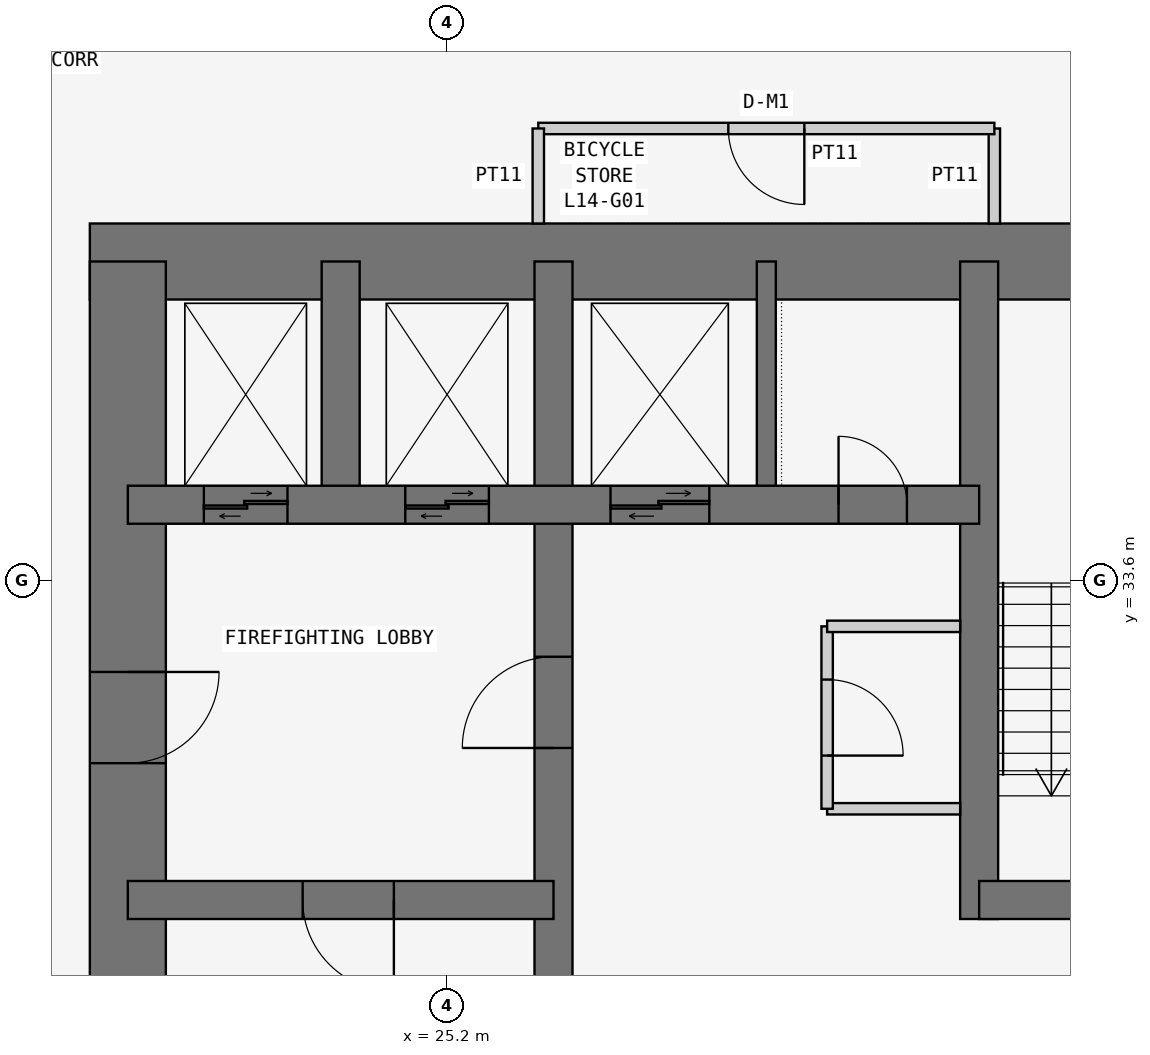
"""IFC4 building model, lengths in metres.
Left out: names, types, materials, properties, quantities, classifications, styles, units other than length and angle.
Written with IfcOpenShell. Run it as: python <this file> out.ifc"""

import sys

from ifc_helpers import new_model, si_unit, direction, frame, frame_2d, origin, place, context, subcontext, project, spatial, rectangle, extrude, element, fill, save


model = new_model("IFC4")
c1 = context("Model", 3, precision=1e-05, world=origin(), true_north=direction((0.0, 1.0)))
c2 = subcontext(c1, "Body", "Model", "MODEL_VIEW")
j1 = project(units=[si_unit("LENGTHUNIT", "METRE"), si_unit("PLANEANGLEUNIT", "RADIAN")], contexts=[c1])
p1 = place(None, origin())
s1 = spatial("IfcSite", under=j1, at=p1, CompositionType="ELEMENT")
p2 = place(p1, origin())
s2 = spatial("IfcBuilding", under=s1, at=p2, CompositionType="ELEMENT")
p3 = place(p2, frame((0.0, 0.0, 59.7)))
s3 = spatial("IfcBuildingStorey", under=s2, at=p3, CompositionType="ELEMENT", Elevation=59.7)
p4 = place(p3, frame((37.8, 37.8, 0.0), z_axis=(0.0, 0.0, 1.0), x_axis=(-1.0, 0.0, 0.0)))
e1 = element("IfcWall", 1, at=p4, inside=s3, PredefinedType="SHEAR", context=c2, shape_type="SweptSolid", body=[
    extrude(rectangle(XDim=17.3, YDim=1.0, at=frame_2d((8.65, 0.0))), origin(), (0.0, 0.0, 1.0), 3.6),
])
p5 = place(p3, frame((21.0, 37.8, 0.0), z_axis=(0.0, 0.0, 1.0), x_axis=(0.0, -1.0, 0.0)))
e2 = element("IfcWall", 2, at=p5, inside=s3, PredefinedType="SHEAR", context=c2, shape_type="SweptSolid", body=[
    extrude(rectangle(XDim=17.3, YDim=1.0, at=frame_2d((8.65, 0.0))), origin(), (0.0, 0.0, 1.0), 3.6),
])
p6 = place(p5, frame((5.4, 0.0, 0.0)))
e3 = element("IfcOpeningElement", 3, at=p6, cuts=e2, PredefinedType="OPENING", context=c2, shape_type="SweptSolid", body=[
    extrude(rectangle(XDim=1.2, YDim=2.1, at=frame_2d((0.6, 1.05))), frame((0.0, 0.51, 0.0), z_axis=(0.0, -1.0, 0.0), x_axis=(1.0, 0.0, 0.0)), (0.0, 0.0, 1.0), 1.02),
])
p7 = place(p3, frame((26.6, 21.0, 0.0), z_axis=(0.0, 0.0, 1.0), x_axis=(0.0, 1.0, 0.0)))
e4 = element("IfcWall", 4, at=p7, inside=s3, PredefinedType="SHEAR", context=c2, shape_type="SweptSolid", body=[
    extrude(rectangle(XDim=16.8, YDim=0.5, at=frame_2d((8.4, 0.0))), origin(), (0.0, 0.0, 1.0), 3.6),
])
p8 = place(p7, frame((10.4, 0.0, 0.0)))
e5 = element("IfcOpeningElement", 5, at=p8, cuts=e4, PredefinedType="OPENING", context=c2, shape_type="SweptSolid", body=[
    extrude(rectangle(XDim=1.2, YDim=2.1, at=frame_2d((0.6, 1.05))), frame((0.0, 0.26, 0.0), z_axis=(0.0, -1.0, 0.0), x_axis=(1.0, 0.0, 0.0)), (0.0, 0.0, 1.0), 0.52),
])
p9 = place(p3, frame((21.0, 29.4, 0.0), z_axis=(0.0, 0.0, 1.0), x_axis=(1.0, 0.0, 0.0)))
e6 = element("IfcWall", 6, at=p9, inside=s3, PredefinedType="SHEAR", context=c2, shape_type="SweptSolid", body=[
    extrude(rectangle(XDim=5.6, YDim=0.5, at=frame_2d((2.8, 0.0))), origin(), (0.0, 0.0, 1.0), 3.6),
])
p10 = place(p9, frame((2.3, 0.0, 0.0)))
e7 = element("IfcOpeningElement", 7, at=p10, cuts=e6, PredefinedType="OPENING", context=c2, shape_type="SweptSolid", body=[
    extrude(rectangle(XDim=1.2, YDim=2.1, at=frame_2d((0.6, 1.05))), frame((0.0, 0.26, 0.0), z_axis=(0.0, -1.0, 0.0), x_axis=(1.0, 0.0, 0.0)), (0.0, 0.0, 1.0), 0.52),
])
p11 = place(p3, frame((21.0, 34.6, 0.0), z_axis=(0.0, 0.0, 1.0), x_axis=(1.0, 0.0, 0.0)))
e8 = element("IfcWall", 8, at=p11, inside=s3, PredefinedType="SHEAR", context=c2, shape_type="SweptSolid", body=[
    extrude(rectangle(XDim=11.2, YDim=0.5, at=frame_2d((5.6, 0.0))), origin(), (0.0, 0.0, 1.0), 3.6),
])
p12 = place(p11, frame((9.35, 0.0, 0.0)))
e9 = element("IfcOpeningElement", 9, at=p12, cuts=e8, PredefinedType="OPENING", context=c2, shape_type="SweptSolid", body=[
    extrude(rectangle(XDim=0.9, YDim=2.1, at=frame_2d((0.45, 1.05))), frame((0.0, 0.26, 0.0), z_axis=(0.0, -1.0, 0.0), x_axis=(1.0, 0.0, 0.0)), (0.0, 0.0, 1.0), 0.52),
])
p13 = place(p11, frame((1.0, 0.0, 0.0)))
e10 = element("IfcOpeningElement", 10, at=p13, cuts=e8, PredefinedType="OPENING", context=c2, shape_type="SweptSolid", body=[
    extrude(rectangle(XDim=1.1, YDim=2.1, at=frame_2d((0.55, 1.05))), frame((0.0, 0.26, 0.0), z_axis=(0.0, -1.0, 0.0), x_axis=(1.0, 0.0, 0.0)), (0.0, 0.0, 1.0), 0.52),
])
p14 = place(p11, frame((3.65, 0.0, 0.0)))
e11 = element("IfcOpeningElement", 11, at=p14, cuts=e8, PredefinedType="OPENING", context=c2, shape_type="SweptSolid", body=[
    extrude(rectangle(XDim=1.1, YDim=2.1, at=frame_2d((0.55, 1.05))), frame((0.0, 0.26, 0.0), z_axis=(0.0, -1.0, 0.0), x_axis=(1.0, 0.0, 0.0)), (0.0, 0.0, 1.0), 0.52),
])
p15 = place(p11, frame((6.35, 0.0, 0.0)))
e12 = element("IfcOpeningElement", 12, at=p15, cuts=e8, PredefinedType="OPENING", context=c2, shape_type="SweptSolid", body=[
    extrude(rectangle(XDim=1.3, YDim=2.1, at=frame_2d((0.65, 1.05))), frame((0.0, 0.26, 0.0), z_axis=(0.0, -1.0, 0.0), x_axis=(1.0, 0.0, 0.0)), (0.0, 0.0, 1.0), 0.52),
])
p16 = place(p3, frame((23.8, 34.6, 0.0), z_axis=(0.0, 0.0, 1.0), x_axis=(0.0, 1.0, 0.0)))
e13 = element("IfcWall", 13, at=p16, inside=s3, PredefinedType="SHEAR", context=c2, shape_type="SweptSolid", body=[
    extrude(rectangle(XDim=3.2, YDim=0.5, at=frame_2d((1.6, 0.0))), origin(), (0.0, 0.0, 1.0), 3.6),
])
p17 = place(p3, frame((32.2, 29.15, 0.0), z_axis=(0.0, 0.0, 1.0), x_axis=(0.0, 1.0, 0.0)))
e14 = element("IfcWall", 14, at=p17, inside=s3, PredefinedType="SHEAR", context=c2, shape_type="SweptSolid", body=[
    extrude(rectangle(XDim=8.65, YDim=0.5, at=frame_2d((4.325, 0.0))), origin(), (0.0, 0.0, 1.0), 3.6),
])
p18 = place(p3, frame((32.2, 29.4, 0.0), z_axis=(0.0, 0.0, 1.0), x_axis=(1.0, 0.0, 0.0)))
e15 = element("IfcWall", 15, at=p18, inside=s3, PredefinedType="SHEAR", context=c2, shape_type="SweptSolid", body=[
    extrude(rectangle(XDim=5.6, YDim=0.5, at=frame_2d((2.8, 0.0))), origin(), (0.0, 0.0, 1.0), 3.6),
])
p19 = place(p18, frame((2.0, 0.0, 0.0)))
e16 = element("IfcOpeningElement", 16, at=p19, cuts=e15, PredefinedType="OPENING", context=c2, shape_type="SweptSolid", body=[
    extrude(rectangle(XDim=1.2, YDim=2.1, at=frame_2d((0.6, 1.05))), frame((0.0, 0.26, 0.0), z_axis=(0.0, -1.0, 0.0), x_axis=(1.0, 0.0, 0.0)), (0.0, 0.0, 1.0), 0.52),
])
p20 = place(p3, frame((29.4, 34.6, 0.0), z_axis=(0.0, 0.0, 1.0), x_axis=(0.0, 1.0, 0.0)))
e17 = element("IfcWall", 17, at=p20, inside=s3, PredefinedType="SHEAR", context=c2, shape_type="SweptSolid", body=[
    extrude(rectangle(XDim=3.2, YDim=0.25, at=frame_2d((1.6, 0.0))), origin(), (0.0, 0.0, 1.0), 3.6),
])
p21 = place(p3, frame((32.4, 38.3, 0.0), z_axis=(0.0, 0.0, 1.0), x_axis=(0.0, 1.0, 0.0)))
e18 = element("IfcWall", 18, at=p21, inside=s3, PredefinedType="PARTITIONING", context=c2, shape_type="SweptSolid", body=[
    extrude(rectangle(XDim=1.25, YDim=0.15, at=frame_2d((0.625, 0.0))), origin(), (0.0, 0.0, 1.0), 3.45),
])
p22 = place(p3, frame((32.4, 39.55, 0.0), z_axis=(0.0, 0.0, 1.0), x_axis=(-1.0, 0.0, 0.0)))
e19 = element("IfcWall", 19, at=p22, inside=s3, PredefinedType="PARTITIONING", context=c2, shape_type="SweptSolid", body=[
    extrude(rectangle(XDim=6.0, YDim=0.15, at=frame_2d((3.0, 0.0))), origin(), (0.0, 0.0, 1.0), 3.45),
])
p23 = place(p22, frame((2.5, 0.0, 0.0)))
e20 = element("IfcOpeningElement", 20, at=p23, cuts=e19, PredefinedType="OPENING", context=c2, shape_type="SweptSolid", body=[
    extrude(rectangle(XDim=1.0, YDim=2.1, at=frame_2d((0.5, 1.05))), frame((0.0, 0.085, 0.0), z_axis=(0.0, -1.0, 0.0), x_axis=(1.0, 0.0, 0.0)), (0.0, 0.0, 1.0), 0.17),
])
p24 = place(p3, frame((26.4, 39.55, 0.0), z_axis=(0.0, 0.0, 1.0), x_axis=(0.0, -1.0, 0.0)))
e21 = element("IfcWall", 21, at=p24, inside=s3, PredefinedType="PARTITIONING", context=c2, shape_type="SweptSolid", body=[
    extrude(rectangle(XDim=1.25, YDim=0.15, at=frame_2d((0.625, 0.0))), origin(), (0.0, 0.0, 1.0), 3.45),
])
p25 = place(p3, frame((31.95, 30.6, 0.0), z_axis=(0.0, 0.0, 1.0), x_axis=(-1.0, 0.0, 0.0)))
e22 = element("IfcWall", 22, at=p25, inside=s3, PredefinedType="PARTITIONING", context=c2, shape_type="SweptSolid", body=[
    extrude(rectangle(XDim=1.75, YDim=0.15, at=frame_2d((0.875, 0.0))), origin(), (0.0, 0.0, 1.0), 3.45),
])
p26 = place(p3, frame((30.2, 30.6, 0.0), z_axis=(0.0, 0.0, 1.0), x_axis=(0.0, 1.0, 0.0)))
e23 = element("IfcWall", 23, at=p26, inside=s3, PredefinedType="PARTITIONING", context=c2, shape_type="SweptSolid", body=[
    extrude(rectangle(XDim=2.4, YDim=0.15, at=frame_2d((1.2, 0.0))), origin(), (0.0, 0.0, 1.0), 3.45),
])
p27 = place(p26, frame((0.7, 0.0, 0.0)))
e24 = element("IfcOpeningElement", 24, at=p27, cuts=e23, PredefinedType="OPENING", context=c2, shape_type="SweptSolid", body=[
    extrude(rectangle(XDim=1.0, YDim=2.1, at=frame_2d((0.5, 1.05))), frame((0.0, 0.085, 0.0), z_axis=(0.0, -1.0, 0.0), x_axis=(1.0, 0.0, 0.0)), (0.0, 0.0, 1.0), 0.17),
])
p28 = place(p3, frame((30.2, 33.0, 0.0), z_axis=(0.0, 0.0, 1.0), x_axis=(1.0, 0.0, 0.0)))
e25 = element("IfcWall", 25, at=p28, inside=s3, PredefinedType="PARTITIONING", context=c2, shape_type="SweptSolid", body=[
    extrude(rectangle(XDim=1.75, YDim=0.15, at=frame_2d((0.875, 0.0))), origin(), (0.0, 0.0, 1.0), 3.45),
])
p29 = place(p23, origin())
e26 = element("IfcDoor", 26, at=p29, inside=s3, OperationType="SINGLE_SWING_LEFT", PredefinedType="DOOR", context=c2, shape_type="SweptSolid", body=[
    extrude(rectangle(XDim=1.0, YDim=2.1, at=frame_2d((0.5, 1.05))), frame((0.0, 0.025, 0.0), z_axis=(0.0, -1.0, 0.0), x_axis=(1.0, 0.0, 0.0)), (0.0, 0.0, 1.0), 0.05),
])
fill(e20, e26)
p30 = place(p6, origin())
e27 = element("IfcDoor", 27, at=p30, inside=s3, OperationType="SINGLE_SWING_LEFT", PredefinedType="DOOR", context=c2, shape_type="SweptSolid", body=[
    extrude(rectangle(XDim=1.2, YDim=2.1, at=frame_2d((0.6, 1.05))), frame((0.0, 0.025, 0.0), z_axis=(0.0, -1.0, 0.0), x_axis=(1.0, 0.0, 0.0)), (0.0, 0.0, 1.0), 0.05),
])
fill(e3, e27)
p31 = place(p10, frame((1.2, 0.0, 0.0), z_axis=(0.0, 0.0, 1.0), x_axis=(-1.0, 0.0, 0.0)))
e28 = element("IfcDoor", 28, at=p31, inside=s3, OperationType="SINGLE_SWING_LEFT", PredefinedType="DOOR", context=c2, shape_type="SweptSolid", body=[
    extrude(rectangle(XDim=1.2, YDim=2.1, at=frame_2d((0.6, 1.05))), frame((0.0, 0.025, 0.0), z_axis=(0.0, -1.0, 0.0), x_axis=(1.0, 0.0, 0.0)), (0.0, 0.0, 1.0), 0.05),
])
fill(e7, e28)
p32 = place(p8, origin())
e29 = element("IfcDoor", 29, at=p32, inside=s3, OperationType="SINGLE_SWING_LEFT", PredefinedType="DOOR", context=c2, shape_type="SweptSolid", body=[
    extrude(rectangle(XDim=1.2, YDim=2.1, at=frame_2d((0.6, 1.05))), frame((0.0, 0.025, 0.0), z_axis=(0.0, -1.0, 0.0), x_axis=(1.0, 0.0, 0.0)), (0.0, 0.0, 1.0), 0.05),
])
fill(e5, e29)
p33 = place(p12, origin())
e30 = element("IfcDoor", 30, at=p33, inside=s3, OperationType="SINGLE_SWING_LEFT", PredefinedType="DOOR", context=c2, shape_type="SweptSolid", body=[
    extrude(rectangle(XDim=0.9, YDim=2.1, at=frame_2d((0.45, 1.05))), frame((0.0, 0.025, 0.0), z_axis=(0.0, -1.0, 0.0), x_axis=(1.0, 0.0, 0.0)), (0.0, 0.0, 1.0), 0.05),
])
fill(e9, e30)
p34 = place(p27, frame((1.0, 0.0, 0.0), z_axis=(0.0, 0.0, 1.0), x_axis=(-1.0, 0.0, 0.0)))
e31 = element("IfcDoor", 31, at=p34, inside=s3, OperationType="SINGLE_SWING_RIGHT", PredefinedType="DOOR", context=c2, shape_type="SweptSolid", body=[
    extrude(rectangle(XDim=1.0, YDim=2.1, at=frame_2d((0.5, 1.05))), frame((0.0, 0.025, 0.0), z_axis=(0.0, -1.0, 0.0), x_axis=(1.0, 0.0, 0.0)), (0.0, 0.0, 1.0), 0.05),
])
fill(e24, e31)
p35 = place(p13, origin())
e32 = element("IfcDoor", 32, at=p35, inside=s3, OperationType="DOUBLE_DOOR_SLIDING", PredefinedType="DOOR", context=c2, shape_type="SweptSolid", body=[
    extrude(rectangle(XDim=1.1, YDim=2.1, at=frame_2d((0.55, 1.05))), frame((0.0, 0.025, 0.0), z_axis=(0.0, -1.0, 0.0), x_axis=(1.0, 0.0, 0.0)), (0.0, 0.0, 1.0), 0.05),
])
fill(e10, e32)
p36 = place(p14, origin())
e33 = element("IfcDoor", 33, at=p36, inside=s3, OperationType="DOUBLE_DOOR_SLIDING", PredefinedType="DOOR", context=c2, shape_type="SweptSolid", body=[
    extrude(rectangle(XDim=1.1, YDim=2.1, at=frame_2d((0.55, 1.05))), frame((0.0, 0.025, 0.0), z_axis=(0.0, -1.0, 0.0), x_axis=(1.0, 0.0, 0.0)), (0.0, 0.0, 1.0), 0.05),
])
fill(e11, e33)
p37 = place(p15, origin())
e34 = element("IfcDoor", 34, at=p37, inside=s3, OperationType="DOUBLE_DOOR_SLIDING", PredefinedType="DOOR", context=c2, shape_type="SweptSolid", body=[
    extrude(rectangle(XDim=1.3, YDim=2.1, at=frame_2d((0.65, 1.05))), frame((0.0, 0.025, 0.0), z_axis=(0.0, -1.0, 0.0), x_axis=(1.0, 0.0, 0.0)), (0.0, 0.0, 1.0), 0.05),
])
fill(e12, e34)
save(model, sys.argv[1])
